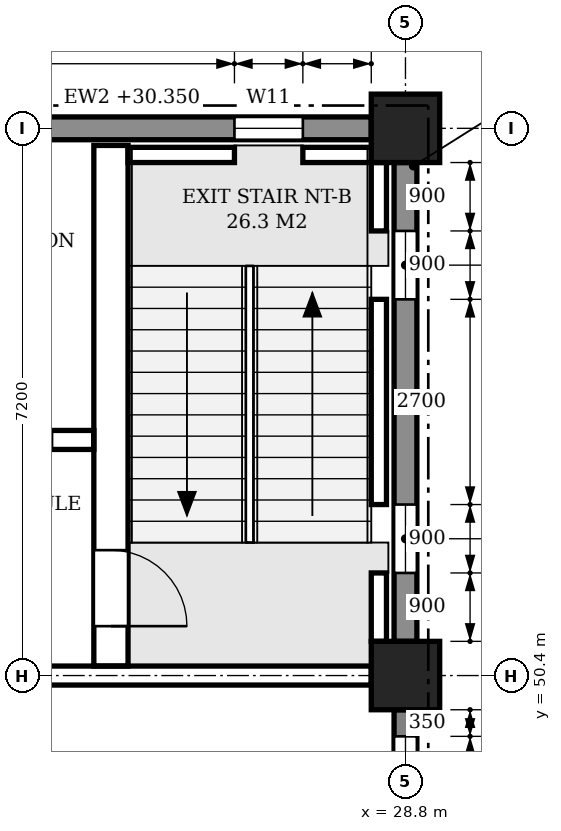
"""IFC4 building model, lengths in metres.
Left out: names, types, materials, properties, quantities, classifications, styles, units other than length and angle.
Written with IfcOpenShell. Run it as: python <this file> out.ifc"""

import sys

from ifc_helpers import new_model, si_unit, direction, frame, frame_2d, origin, origin_2d, place, context, subcontext, project, spatial, polyline, rectangle, outline, extrude, element, fill, save


model = new_model("IFC4")
c1 = context("Model", 3, precision=1e-05, world=origin(), true_north=direction((0.0, 1.0)))
c2 = subcontext(c1, "Body", "Model", "MODEL_VIEW")
j1 = project(units=[si_unit("LENGTHUNIT", "METRE"), si_unit("PLANEANGLEUNIT", "RADIAN")], contexts=[c1])
p1 = place(None, origin())
s1 = spatial("IfcSite", under=j1, at=p1, CompositionType="ELEMENT")
p2 = place(p1, origin())
s2 = spatial("IfcBuilding", under=s1, at=p2, CompositionType="ELEMENT")
p3 = place(p2, frame((0.0, 0.0, 26.4)))
s3 = spatial("IfcBuildingStorey", under=s2, at=p3, CompositionType="ELEMENT", Elevation=26.4)
for number, where, z_axis, x_axis in (
    (1, (28.8, 50.4, 0.0), (0.0, 0.0, 1.0), (1.0, 0.0, 0.0)),
    (2, (28.8, 57.6, 0.0), (0.0, 0.0, 1.0), (1.0, 0.0, 0.0)),
):
    element("IfcColumn", number, at=place(p3, frame(where, z_axis=z_axis, x_axis=x_axis)), inside=s3, PredefinedType="COLUMN", context=c2, shape_type="SweptSolid", body=[
        extrude(rectangle(XDim=0.9, YDim=0.9, at=origin_2d()), origin(), (0.0, 0.0, 1.0), 4.8),
    ])
p4 = place(p3, frame((28.35, 57.6, 0.0), z_axis=(0.0, 0.0, 1.0), x_axis=(-1.0, 0.0, 0.0)))
e3 = element("IfcWall", 3, at=p4, inside=s3, PredefinedType="STANDARD", context=c2, shape_type="SweptSolid", body=[
    extrude(rectangle(XDim=6.3, YDim=0.3, at=frame_2d((3.15, 0.0))), origin(), (0.0, 0.0, 1.0), 3.95),
])
p5 = place(p4, frame((0.9, 0.0, 0.9)))
e4 = element("IfcOpeningElement", 4, at=p5, cuts=e3, PredefinedType="OPENING", context=c2, shape_type="SweptSolid", body=[
    extrude(outline(polyline([(0.0, 0.0), (0.9, 0.0), (0.9, 2.05), (0.45, 2.5), (0.0, 2.05), (0.0, 0.0)])), frame((0.0, 0.16, 0.0), z_axis=(0.0, -1.0, 0.0), x_axis=(1.0, 0.0, 0.0)), (0.0, 0.0, 1.0), 0.32),
])
p6 = place(p3, frame((28.8, 43.65, 0.0), z_axis=(0.0, 0.0, 1.0), x_axis=(0.0, 1.0, 0.0)))
e5 = element("IfcWall", 5, at=p6, inside=s3, PredefinedType="STANDARD", context=c2, shape_type="SweptSolid", body=[
    extrude(rectangle(XDim=6.3, YDim=0.3, at=frame_2d((3.15, 0.0))), origin(), (0.0, 0.0, 1.0), 3.95),
])
p7 = place(p6, frame((3.95, 0.0, 0.9)))
e6 = element("IfcOpeningElement", 6, at=p7, cuts=e5, PredefinedType="OPENING", context=c2, shape_type="SweptSolid", body=[
    extrude(outline(polyline([(0.0, 0.0), (0.85, 0.0), (0.85, 2.05), (0.425, 2.5), (0.0, 2.05), (0.0, 0.0)])), frame((0.0, 0.16, 0.0), z_axis=(0.0, -1.0, 0.0), x_axis=(1.0, 0.0, 0.0)), (0.0, 0.0, 1.0), 0.32),
])
p8 = place(p6, frame((5.1, 0.0, 0.9)))
e7 = element("IfcOpeningElement", 7, at=p8, cuts=e5, PredefinedType="OPENING", context=c2, shape_type="SweptSolid", body=[
    extrude(outline(polyline([(0.0, 0.0), (0.85, 0.0), (0.85, 2.05), (0.425, 2.5), (0.0, 2.05), (0.0, 0.0)])), frame((0.0, 0.16, 0.0), z_axis=(0.0, -1.0, 0.0), x_axis=(1.0, 0.0, 0.0)), (0.0, 0.0, 1.0), 0.32),
])
p9 = place(p3, frame((28.8, 50.85, 0.0), z_axis=(0.0, 0.0, 1.0), x_axis=(0.0, 1.0, 0.0)))
e8 = element("IfcWall", 8, at=p9, inside=s3, PredefinedType="STANDARD", context=c2, shape_type="SweptSolid", body=[
    extrude(rectangle(XDim=6.3, YDim=0.3, at=frame_2d((3.15, 0.0))), origin(), (0.0, 0.0, 1.0), 3.95),
])
p10 = place(p9, frame((0.9, 0.0, 0.9)))
e9 = element("IfcOpeningElement", 9, at=p10, cuts=e8, PredefinedType="OPENING", context=c2, shape_type="SweptSolid", body=[
    extrude(outline(polyline([(0.0, 0.0), (0.9, 0.0), (0.9, 2.05), (0.45, 2.5), (0.0, 2.05), (0.0, 0.0)])), frame((0.0, 0.16, 0.0), z_axis=(0.0, -1.0, 0.0), x_axis=(1.0, 0.0, 0.0)), (0.0, 0.0, 1.0), 0.32),
])
p11 = place(p9, frame((4.5, 0.0, 0.9)))
e10 = element("IfcOpeningElement", 10, at=p11, cuts=e8, PredefinedType="OPENING", context=c2, shape_type="SweptSolid", body=[
    extrude(outline(polyline([(0.0, 0.0), (0.9, 0.0), (0.9, 2.05), (0.45, 2.5), (0.0, 2.05), (0.0, 0.0)])), frame((0.0, 0.16, 0.0), z_axis=(0.0, -1.0, 0.0), x_axis=(1.0, 0.0, 0.0)), (0.0, 0.0, 1.0), 0.32),
])
p12 = place(p3, frame((22.05, 50.4, 0.0), z_axis=(0.0, 0.0, 1.0), x_axis=(1.0, 0.0, 0.0)))
e11 = element("IfcWall", 11, at=p12, inside=s3, PredefinedType="SHEAR", context=c2, shape_type="SweptSolid", body=[
    extrude(rectangle(XDim=6.3, YDim=0.25, at=frame_2d((3.15, 0.0))), origin(), (0.0, 0.0, 1.0), 3.8),
])
p13 = place(p12, frame((0.4, 0.0, 0.0)))
e12 = element("IfcOpeningElement", 12, at=p13, cuts=e11, PredefinedType="OPENING", context=c2, shape_type="SweptSolid", body=[
    extrude(rectangle(XDim=1.1, YDim=2.1, at=frame_2d((0.55, 1.05))), frame((0.0, 0.135, 0.0), z_axis=(0.0, -1.0, 0.0), x_axis=(1.0, 0.0, 0.0)), (0.0, 0.0, 1.0), 0.27),
])
p14 = place(p3, frame((28.45, 50.85, -0.25), z_axis=(0.0, 0.0, 1.0), x_axis=(0.0, 1.0, 0.0)))
e13 = element("IfcWall", 13, at=p14, inside=s3, PredefinedType="SHEAR", context=c2, shape_type="SweptSolid", body=[
    extrude(rectangle(XDim=0.9, YDim=0.2, at=frame_2d((0.45, 0.0))), origin(), (0.0, 0.0, 1.0), 4.8),
])
p15 = place(p3, frame((28.45, 52.65, -0.25), z_axis=(0.0, 0.0, 1.0), x_axis=(0.0, 1.0, 0.0)))
e14 = element("IfcWall", 14, at=p15, inside=s3, PredefinedType="SHEAR", context=c2, shape_type="SweptSolid", body=[
    extrude(rectangle(XDim=2.7, YDim=0.2, at=frame_2d((1.35, 0.0))), origin(), (0.0, 0.0, 1.0), 4.8),
])
p16 = place(p3, frame((28.45, 56.25, -0.25), z_axis=(0.0, 0.0, 1.0), x_axis=(0.0, 1.0, 0.0)))
e15 = element("IfcWall", 15, at=p16, inside=s3, PredefinedType="SHEAR", context=c2, shape_type="SweptSolid", body=[
    extrude(rectangle(XDim=0.9, YDim=0.2, at=frame_2d((0.45, 0.0))), origin(), (0.0, 0.0, 1.0), 4.8),
])
p17 = place(p3, frame((25.15, 57.25, -0.25), z_axis=(0.0, 0.0, 1.0), x_axis=(1.0, 0.0, 0.0)))
e16 = element("IfcWall", 16, at=p17, inside=s3, PredefinedType="SHEAR", context=c2, shape_type="SweptSolid", body=[
    extrude(rectangle(XDim=1.4, YDim=0.2, at=frame_2d((0.7, 0.0))), origin(), (0.0, 0.0, 1.0), 4.8),
])
p18 = place(p3, frame((27.45, 57.25, -0.25), z_axis=(0.0, 0.0, 1.0), x_axis=(1.0, 0.0, 0.0)))
e17 = element("IfcWall", 17, at=p18, inside=s3, PredefinedType="SHEAR", context=c2, shape_type="SweptSolid", body=[
    extrude(rectangle(XDim=0.9, YDim=0.2, at=frame_2d((0.45, 0.0))), origin(), (0.0, 0.0, 1.0), 4.8),
])
p19 = place(p3, frame((24.925, 50.525, 0.0), z_axis=(0.0, 0.0, 1.0), x_axis=(0.0, 1.0, 0.0)))
e18 = element("IfcWall", 18, at=p19, inside=s3, PredefinedType="SHEAR", context=c2, shape_type="SweptSolid", body=[
    extrude(rectangle(XDim=6.85, YDim=0.45, at=frame_2d((3.425, 0.0))), origin(), (0.0, 0.0, 1.0), 4.55),
])
p20 = place(p19, frame((0.525, 0.0, 0.0)))
e19 = element("IfcOpeningElement", 19, at=p20, cuts=e18, PredefinedType="OPENING", context=c2, shape_type="SweptSolid", body=[
    extrude(rectangle(XDim=1.0, YDim=2.1, at=frame_2d((0.5, 1.05))), frame((0.0, 0.235, 0.0), z_axis=(0.0, -1.0, 0.0), x_axis=(1.0, 0.0, 0.0)), (0.0, 0.0, 1.0), 0.47),
])
p21 = place(p3, frame((21.725, 53.5, 0.0), z_axis=(0.0, 0.0, 1.0), x_axis=(1.0, 0.0, 0.0)))
e20 = element("IfcWall", 20, at=p21, inside=s3, PredefinedType="SHEAR", context=c2, shape_type="SweptSolid", body=[
    extrude(rectangle(XDim=2.975, YDim=0.25, at=frame_2d((1.487, 0.0))), origin(), (0.0, 0.0, 1.0), 4.55),
])
p22 = place(p21, frame((1.525, 0.0, 0.0)))
e21 = element("IfcOpeningElement", 21, at=p22, cuts=e20, PredefinedType="OPENING", context=c2, shape_type="SweptSolid", body=[
    extrude(rectangle(XDim=0.9, YDim=2.1, at=frame_2d((0.45, 1.05))), frame((0.0, 0.135, 0.0), z_axis=(0.0, -1.0, 0.0), x_axis=(1.0, 0.0, 0.0)), (0.0, 0.0, 1.0), 0.27),
])
p23 = place(p8, origin())
e22 = element("IfcWindow", 22, at=p23, inside=s3, PartitioningType="SINGLE_PANEL", PredefinedType="WINDOW", context=c2, shape_type="SweptSolid", body=[
    extrude(outline(polyline([(0.0, 0.0), (0.85, 0.0), (0.85, 2.05), (0.425, 2.5), (0.0, 2.05), (0.0, 0.0)])), frame((0.0, 0.03, 0.0), z_axis=(0.0, -1.0, 0.0), x_axis=(1.0, 0.0, 0.0)), (0.0, 0.0, 1.0), 0.06),
])
fill(e7, e22)
p24 = place(p10, origin())
e23 = element("IfcWindow", 23, at=p24, inside=s3, PartitioningType="SINGLE_PANEL", PredefinedType="WINDOW", context=c2, shape_type="SweptSolid", body=[
    extrude(outline(polyline([(0.0, 0.0), (0.9, 0.0), (0.9, 2.05), (0.45, 2.5), (0.0, 2.05), (0.0, 0.0)])), frame((0.0, 0.03, 0.0), z_axis=(0.0, -1.0, 0.0), x_axis=(1.0, 0.0, 0.0)), (0.0, 0.0, 1.0), 0.06),
])
fill(e9, e23)
p25 = place(p11, origin())
e24 = element("IfcWindow", 24, at=p25, inside=s3, PartitioningType="SINGLE_PANEL", PredefinedType="WINDOW", context=c2, shape_type="SweptSolid", body=[
    extrude(outline(polyline([(0.0, 0.0), (0.9, 0.0), (0.9, 2.05), (0.45, 2.5), (0.0, 2.05), (0.0, 0.0)])), frame((0.0, 0.03, 0.0), z_axis=(0.0, -1.0, 0.0), x_axis=(1.0, 0.0, 0.0)), (0.0, 0.0, 1.0), 0.06),
])
fill(e10, e24)
p26 = place(p5, origin())
e25 = element("IfcWindow", 25, at=p26, inside=s3, PartitioningType="SINGLE_PANEL", PredefinedType="WINDOW", context=c2, shape_type="SweptSolid", body=[
    extrude(outline(polyline([(0.0, 0.0), (0.9, 0.0), (0.9, 2.05), (0.45, 2.5), (0.0, 2.05), (0.0, 0.0)])), frame((0.0, 0.03, 0.0), z_axis=(0.0, -1.0, 0.0), x_axis=(1.0, 0.0, 0.0)), (0.0, 0.0, 1.0), 0.06),
])
fill(e4, e25)
p27 = place(p20, frame((1.0, 0.0, 0.0), z_axis=(0.0, 0.0, 1.0), x_axis=(-1.0, 0.0, 0.0)))
e26 = element("IfcDoor", 26, at=p27, inside=s3, OperationType="SINGLE_SWING_RIGHT", PredefinedType="DOOR", context=c2, shape_type="SweptSolid", body=[
    extrude(rectangle(XDim=1.0, YDim=2.1, at=frame_2d((0.5, 1.05))), frame((0.0, 0.025, 0.0), z_axis=(0.0, -1.0, 0.0), x_axis=(1.0, 0.0, 0.0)), (0.0, 0.0, 1.0), 0.05),
])
fill(e19, e26)
save(model, sys.argv[1])
